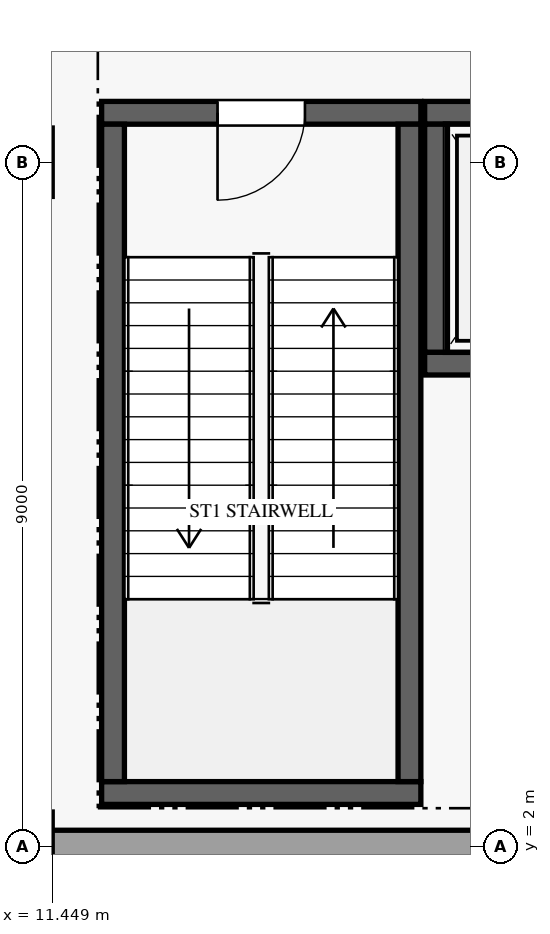
"""IFC4 building model, lengths in metres.
Left out: names, types, materials, properties, quantities, classifications, styles, units other than length and angle.
Written with IfcOpenShell. Run it as: python <this file> out.ifc"""

import sys

from ifc_helpers import new_model, si_unit, direction, frame, frame_2d, origin, place, context, subcontext, project, spatial, rectangle, extrude, element, fill, save


model = new_model("IFC4")
c1 = context("Model", 3, precision=1e-05, world=origin(), true_north=direction((0.0, 1.0)))
c2 = subcontext(c1, "Body", "Model", "MODEL_VIEW")
j1 = project(units=[si_unit("LENGTHUNIT", "METRE"), si_unit("PLANEANGLEUNIT", "RADIAN")], contexts=[c1])
p1 = place(None, origin())
s1 = spatial("IfcSite", under=j1, at=p1, CompositionType="ELEMENT")
p2 = place(p1, origin())
s2 = spatial("IfcBuilding", under=s1, at=p2, CompositionType="ELEMENT")
p3 = place(p2, frame((0.0, 0.0, -4.8)))
s3 = spatial("IfcBuildingStorey", under=s2, at=p3, CompositionType="ELEMENT", Elevation=-4.8)
p4 = place(p3, frame((10.79, 2.0, 0.0), z_axis=(0.0, 0.0, 1.0), x_axis=(1.0, 0.0, 0.0)))
e1 = element("IfcWall", 1, at=p4, inside=s3, PredefinedType="SOLIDWALL", context=c2, shape_type="SweptSolid", body=[
    extrude(rectangle(XDim=45.42, YDim=0.42, at=frame_2d((22.71, 0.0))), origin(), (0.0, 0.0, 1.0), 3.215),
])
p5 = place(p3, frame((12.1, 11.65, 0.0), z_axis=(0.0, 0.0, 1.0), x_axis=(1.0, 0.0, 0.0)))
e2 = element("IfcWall", 2, at=p5, inside=s3, PredefinedType="SHEAR", context=c2, shape_type="SweptSolid", body=[
    extrude(rectangle(XDim=4.2, YDim=0.3, at=frame_2d((2.1, 0.0))), origin(), (0.0, 0.0, 1.0), 4.48),
])
p6 = place(p5, frame((2.675, 0.0, 0.0), z_axis=(0.0, 0.0, 1.0), x_axis=(-1.0, 0.0, 0.0)))
e3 = element("IfcOpeningElement", 3, at=p6, cuts=e2, PredefinedType="OPENING", context=c2, shape_type="SweptSolid", body=[
    extrude(rectangle(XDim=1.15, YDim=2.2, at=frame_2d((0.575, 1.1))), frame((0.0, 0.16, 0.0), z_axis=(0.0, -1.0, 0.0), x_axis=(1.0, 0.0, 0.0)), (0.0, 0.0, 1.0), 0.32),
])
p7 = place(p3, frame((12.1, 2.7, 0.0), z_axis=(0.0, 0.0, 1.0), x_axis=(1.0, 0.0, 0.0)))
e4 = element("IfcWall", 4, at=p7, inside=s3, PredefinedType="SHEAR", context=c2, shape_type="SweptSolid", body=[
    extrude(rectangle(XDim=4.2, YDim=0.3, at=frame_2d((2.1, 0.0))), origin(), (0.0, 0.0, 1.0), 4.48),
])
for number, where, z_axis, x_axis in (
    (5, (12.25, 2.85, 0.0), (0.0, 0.0, 1.0), (0.0, 1.0, 0.0)),
    (6, (16.15, 2.85, 0.0), (0.0, 0.0, 1.0), (0.0, 1.0, 0.0)),
):
    element("IfcWall", number, at=place(p3, frame(where, z_axis=z_axis, x_axis=x_axis)), inside=s3, PredefinedType="SHEAR", context=c2, shape_type="SweptSolid", body=[
        extrude(rectangle(XDim=8.65, YDim=0.3, at=frame_2d((4.325, 0.0))), origin(), (0.0, 0.0, 1.0), 4.48),
    ])
p8 = place(p3, frame((16.35, 11.65, 0.0), z_axis=(0.0, 0.0, 1.0), x_axis=(1.0, 0.0, 0.0)))
e7 = element("IfcWall", 7, at=p8, inside=s3, PredefinedType="SHEAR", context=c2, shape_type="SweptSolid", body=[
    extrude(rectangle(XDim=2.6, YDim=0.3, at=frame_2d((1.3, 0.0))), origin(), (0.0, 0.0, 1.0), 4.48),
])
p9 = place(p8, frame((0.75, 0.0, 0.0)))
e8 = element("IfcOpeningElement", 8, at=p9, cuts=e7, PredefinedType="OPENING", context=c2, shape_type="SweptSolid", body=[
    extrude(rectangle(XDim=1.1, YDim=2.2, at=frame_2d((0.55, 1.1))), frame((0.0, 0.16, 0.0), z_axis=(0.0, -1.0, 0.0), x_axis=(1.0, 0.0, 0.0)), (0.0, 0.0, 1.0), 0.32),
])
p10 = place(p3, frame((16.35, 8.35, 0.0), z_axis=(0.0, 0.0, 1.0), x_axis=(1.0, 0.0, 0.0)))
e9 = element("IfcWall", 9, at=p10, inside=s3, PredefinedType="SHEAR", context=c2, shape_type="SweptSolid", body=[
    extrude(rectangle(XDim=2.6, YDim=0.3, at=frame_2d((1.3, 0.0))), origin(), (0.0, 0.0, 1.0), 4.48),
])
p11 = place(p3, frame((16.5, 8.5, 0.0), z_axis=(0.0, 0.0, 1.0), x_axis=(0.0, 1.0, 0.0)))
e10 = element("IfcWall", 10, at=p11, inside=s3, PredefinedType="SHEAR", context=c2, shape_type="SweptSolid", body=[
    extrude(rectangle(XDim=3.0, YDim=0.3, at=frame_2d((1.5, 0.0))), origin(), (0.0, 0.0, 1.0), 4.48),
])
p12 = place(p6, origin())
e11 = element("IfcDoor", 11, at=p12, inside=s3, OperationType="SINGLE_SWING_RIGHT", PredefinedType="DOOR", context=c2, shape_type="SweptSolid", body=[
    extrude(rectangle(XDim=1.15, YDim=2.2, at=frame_2d((0.575, 1.1))), frame((0.0, 0.025, 0.0), z_axis=(0.0, -1.0, 0.0), x_axis=(1.0, 0.0, 0.0)), (0.0, 0.0, 1.0), 0.05),
])
fill(e3, e11)
save(model, sys.argv[1])
